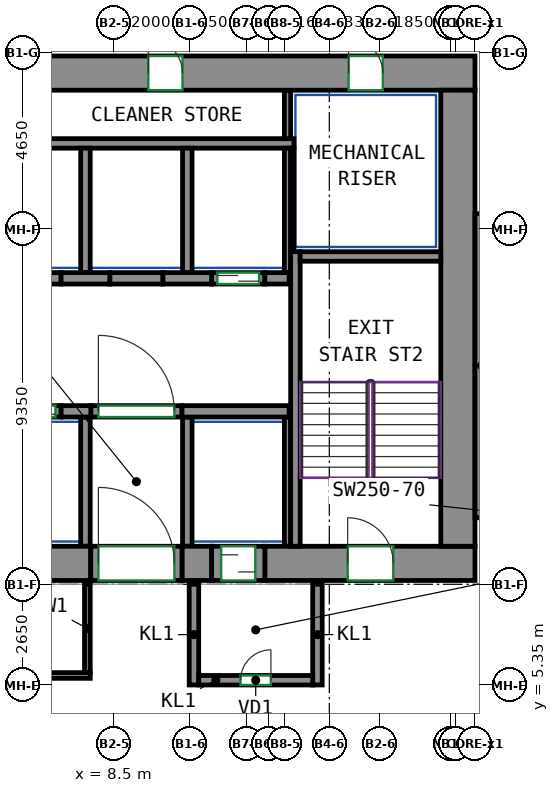
"""IFC4 building model, lengths in metres.
Left out: names, types, materials, properties, quantities, classifications, styles, units other than length and angle.
Written with IfcOpenShell. Run it as: python <this file> out.ifc"""

import sys

from ifc_helpers import new_model, si_unit, direction, frame, frame_2d, origin, place, context, subcontext, project, spatial, rectangle, extrude, source, transform, mapped, element, fill, save


model = new_model("IFC4")
c1 = context("Model", 3, precision=1e-05, world=origin(), true_north=direction((0.0, 1.0)))
c2 = subcontext(c1, "Body", "Model", "MODEL_VIEW")
j1 = project(units=[si_unit("LENGTHUNIT", "METRE"), si_unit("PLANEANGLEUNIT", "RADIAN")], contexts=[c1])
p1 = place(None, origin())
s1 = spatial("IfcSite", under=j1, at=p1, CompositionType="ELEMENT")
p2 = place(p1, origin())
s2 = spatial("IfcBuilding", under=s1, at=p2, CompositionType="ELEMENT")
p3 = place(p2, frame((0.0, 0.0, 178.7)))
s3 = spatial("IfcBuildingStorey", under=s2, at=p3, CompositionType="ELEMENT", Elevation=178.7)
m1 = source(origin(), c2, "Body", "SweptSolid", [
    extrude(rectangle(XDim=14.18, YDim=0.9, at=frame_2d((7.09, 0.0))), origin(), (0.0, 0.0, 1.0), 3.12),
])
p4 = place(p3, frame((-6.29, 8.55, 0.0), z_axis=(0.0, 0.0, 1.0), x_axis=(1.0, 0.0, 0.0)))
e1 = element("IfcWall", 1, at=p4, inside=s3, PredefinedType="SHEAR", context=c2, shape_type="MappedRepresentation", body=[
    mapped(m1, transform((0.0, 0.0, 0.0))),
])
m2 = source(origin(), c2, "Body", "SweptSolid", [
    extrude(rectangle(XDim=0.78, YDim=0.9, at=frame_2d((0.39, 0.0))), origin(), (0.0, 0.0, 1.0), 3.12),
])
p5 = place(p3, frame((10.29, 8.55, 0.0), z_axis=(0.0, 0.0, 1.0), x_axis=(1.0, 0.0, 0.0)))
e2 = element("IfcWall", 2, at=p5, inside=s3, PredefinedType="SHEAR", context=c2, shape_type="MappedRepresentation", body=[
    mapped(m2, transform((0.0, 0.0, 0.0))),
])
m3 = source(origin(), c2, "Body", "SweptSolid", [
    extrude(rectangle(XDim=5.53, YDim=0.9, at=frame_2d((2.765, 0.0))), origin(), (0.0, 0.0, 1.0), 3.12),
])
p6 = place(p3, frame((12.47, 8.55, 0.0), z_axis=(0.0, 0.0, 1.0), x_axis=(1.0, 0.0, 0.0)))
e3 = element("IfcWall", 3, at=p6, inside=s3, PredefinedType="SHEAR", context=c2, shape_type="MappedRepresentation", body=[
    mapped(m3, transform((0.0, 0.0, 0.0))),
])
p7 = place(p6, frame((2.18, 0.0, 0.0)))
e4 = element("IfcOpeningElement", 4, at=p7, cuts=e3, PredefinedType="OPENING", context=c2, shape_type="SweptSolid", body=[
    extrude(rectangle(XDim=1.2, YDim=2.1, at=frame_2d((0.6, 1.05))), frame((0.0, 0.46, 0.0), z_axis=(0.0, -1.0, 0.0), x_axis=(1.0, 0.0, 0.0)), (0.0, 0.0, 1.0), 0.92),
])
m4 = source(origin(), c2, "Body", "SweptSolid", [
    extrude(rectangle(XDim=33.9, YDim=0.9, at=frame_2d((16.95, 0.0))), origin(), (0.0, 0.0, 1.0), 3.12),
])
p8 = place(p3, frame((-15.9, 21.45, 0.0), z_axis=(0.0, 0.0, 1.0), x_axis=(1.0, 0.0, 0.0)))
e5 = element("IfcWall", 5, at=p8, inside=s3, PredefinedType="SHEAR", context=c2, shape_type="MappedRepresentation", body=[
    mapped(m4, transform((0.0, 0.0, 0.0))),
])
p9 = place(p8, frame((8.42, 0.0, 0.0)))
e6 = element("IfcOpeningElement", 6, at=p9, cuts=e5, PredefinedType="OPENING", context=c2, shape_type="SweptSolid", body=[
    extrude(rectangle(XDim=0.9, YDim=2.1, at=frame_2d((0.45, 1.05))), frame((0.0, 0.46, 0.0), z_axis=(0.0, -1.0, 0.0), x_axis=(1.0, 0.0, 0.0)), (0.0, 0.0, 1.0), 0.92),
])
p10 = place(p8, frame((15.12, 0.0, 0.0)))
e7 = element("IfcOpeningElement", 7, at=p10, cuts=e5, PredefinedType="OPENING", context=c2, shape_type="SweptSolid", body=[
    extrude(rectangle(XDim=0.9, YDim=2.1, at=frame_2d((0.45, 1.05))), frame((0.0, 0.46, 0.0), z_axis=(0.0, -1.0, 0.0), x_axis=(1.0, 0.0, 0.0)), (0.0, 0.0, 1.0), 0.92),
])
p11 = place(p8, frame((19.944, 0.0, 0.0)))
e8 = element("IfcOpeningElement", 8, at=p11, cuts=e5, PredefinedType="OPENING", context=c2, shape_type="SweptSolid", body=[
    extrude(rectangle(XDim=0.9, YDim=2.1, at=frame_2d((0.45, 1.05))), frame((0.0, 0.46, 0.0), z_axis=(0.0, -1.0, 0.0), x_axis=(1.0, 0.0, 0.0)), (0.0, 0.0, 1.0), 0.92),
])
p12 = place(p8, frame((25.304, 0.0, 0.0)))
e9 = element("IfcOpeningElement", 9, at=p12, cuts=e5, PredefinedType="OPENING", context=c2, shape_type="SweptSolid", body=[
    extrude(rectangle(XDim=0.9, YDim=2.1, at=frame_2d((0.45, 1.05))), frame((0.0, 0.46, 0.0), z_axis=(0.0, -1.0, 0.0), x_axis=(1.0, 0.0, 0.0)), (0.0, 0.0, 1.0), 0.92),
])
p13 = place(p8, frame((2.425, 0.0, 0.0)))
e10 = element("IfcOpeningElement", 10, at=p13, cuts=e5, PredefinedType="OPENING", context=c2, shape_type="SweptSolid", body=[
    extrude(rectangle(XDim=0.9, YDim=2.1, at=frame_2d((0.45, 1.05))), frame((0.0, 0.46, 0.0), z_axis=(0.0, -1.0, 0.0), x_axis=(1.0, 0.0, 0.0)), (0.0, 0.0, 1.0), 0.92),
])
p14 = place(p8, frame((30.575, 0.0, 0.0)))
e11 = element("IfcOpeningElement", 11, at=p14, cuts=e5, PredefinedType="OPENING", context=c2, shape_type="SweptSolid", body=[
    extrude(rectangle(XDim=0.9, YDim=2.1, at=frame_2d((0.45, 1.05))), frame((0.0, 0.46, 0.0), z_axis=(0.0, -1.0, 0.0), x_axis=(1.0, 0.0, 0.0)), (0.0, 0.0, 1.0), 0.92),
])
m5 = source(origin(), c2, "Body", "SweptSolid", [
    extrude(rectangle(XDim=12.0, YDim=0.9, at=frame_2d((6.0, 0.0))), origin(), (0.0, 0.0, 1.0), 3.12),
])
p15 = place(p3, frame((17.55, 9.0, 0.0), z_axis=(0.0, 0.0, 1.0), x_axis=(0.0, 1.0, 0.0)))
e12 = element("IfcWall", 12, at=p15, inside=s3, PredefinedType="SHEAR", context=c2, shape_type="MappedRepresentation", body=[
    mapped(m5, transform((0.0, 0.0, 0.0))),
])
m6 = source(origin(), c2, "Body", "SweptSolid", [
    extrude(rectangle(XDim=7.75, YDim=0.25, at=frame_2d((3.875, 0.0))), origin(), (0.0, 0.0, 1.0), 3.12),
])
p16 = place(p3, frame((13.275, 9.0, 0.0), z_axis=(0.0, 0.0, 1.0), x_axis=(0.0, 1.0, 0.0)))
e13 = element("IfcWall", 13, at=p16, inside=s3, PredefinedType="SHEAR", context=c2, shape_type="MappedRepresentation", body=[
    mapped(m6, transform((0.0, 0.0, 0.0))),
])
m7 = source(origin(), c2, "Body", "SweptSolid", [
    extrude(rectangle(XDim=3.7, YDim=0.25, at=frame_2d((1.85, 0.0))), origin(), (0.0, 0.0, 1.0), 3.12),
])
p17 = place(p3, frame((13.4, 16.625, 0.0), z_axis=(0.0, 0.0, 1.0), x_axis=(1.0, 0.0, 0.0)))
e14 = element("IfcWall", 14, at=p17, inside=s3, PredefinedType="SHEAR", context=c2, shape_type="MappedRepresentation", body=[
    mapped(m7, transform((0.0, 0.0, 0.0))),
])
m8 = source(origin(), c2, "Body", "SweptSolid", [
    extrude(rectangle(XDim=8.0, YDim=0.35, at=frame_2d((4.0, 0.0))), origin(), (0.0, 0.0, 1.0), 3.12),
])
p18 = place(p3, frame((18.175, 9.75, 0.0), z_axis=(0.0, 0.0, 1.0), x_axis=(0.0, 1.0, 0.0)))
e15 = element("IfcWall", 15, at=p18, inside=s3, PredefinedType="SHEAR", context=c2, shape_type="MappedRepresentation", body=[
    mapped(m8, transform((0.0, 0.0, 0.0))),
])
m9 = source(origin(), c2, "Body", "SweptSolid", [
    extrude(rectangle(XDim=0.78, YDim=0.3, at=frame_2d((0.39, 0.0))), origin(), (0.0, 0.0, 1.0), 3.12),
])
p19 = place(p3, frame((7.11, 12.55, 0.0), z_axis=(0.0, 0.0, 1.0), x_axis=(1.0, 0.0, 0.0)))
e16 = element("IfcWall", 16, at=p19, inside=s3, PredefinedType="SHEAR", context=c2, shape_type="MappedRepresentation", body=[
    mapped(m9, transform((0.0, 0.0, 0.0))),
])
m10 = source(origin(), c2, "Body", "SweptSolid", [
    extrude(rectangle(XDim=2.82, YDim=0.3, at=frame_2d((1.41, 0.0))), origin(), (0.0, 0.0, 1.0), 3.12),
])
p20 = place(p3, frame((10.29, 12.55, 0.0), z_axis=(0.0, 0.0, 1.0), x_axis=(1.0, 0.0, 0.0)))
e17 = element("IfcWall", 17, at=p20, inside=s3, PredefinedType="SHEAR", context=c2, shape_type="MappedRepresentation", body=[
    mapped(m10, transform((0.0, 0.0, 0.0))),
])
m11 = source(origin(), c2, "Body", "SweptSolid", [
    extrude(rectangle(XDim=1.28, YDim=0.3, at=frame_2d((0.64, 0.0))), origin(), (0.0, 0.0, 1.0), 3.12),
])
p21 = place(p3, frame((7.11, 16.05, 0.0), z_axis=(0.0, 0.0, 1.0), x_axis=(1.0, 0.0, 0.0)))
e18 = element("IfcWall", 18, at=p21, inside=s3, PredefinedType="SHEAR", context=c2, shape_type="MappedRepresentation", body=[
    mapped(m11, transform((0.0, 0.0, 0.0))),
])
m12 = source(origin(), c2, "Body", "SweptSolid", [
    extrude(rectangle(XDim=1.28, YDim=0.3, at=frame_2d((0.64, 0.0))), origin(), (0.0, 0.0, 1.0), 3.12),
])
p22 = place(p3, frame((9.79, 16.05, 0.0), z_axis=(0.0, 0.0, 1.0), x_axis=(1.0, 0.0, 0.0)))
e19 = element("IfcWall", 19, at=p22, inside=s3, PredefinedType="SHEAR", context=c2, shape_type="MappedRepresentation", body=[
    mapped(m12, transform((0.0, 0.0, 0.0))),
])
m13 = source(origin(), c2, "Body", "SweptSolid", [
    extrude(rectangle(XDim=0.64, YDim=0.3, at=frame_2d((0.32, 0.0))), origin(), (0.0, 0.0, 1.0), 3.12),
])
p23 = place(p3, frame((12.47, 16.05, 0.0), z_axis=(0.0, 0.0, 1.0), x_axis=(1.0, 0.0, 0.0)))
e20 = element("IfcWall", 20, at=p23, inside=s3, PredefinedType="SHEAR", context=c2, shape_type="MappedRepresentation", body=[
    mapped(m13, transform((0.0, 0.0, 0.0))),
])
m14 = source(origin(), c2, "Body", "SweptSolid", [
    extrude(rectangle(XDim=1.4, YDim=0.3, at=frame_2d((0.7, 0.0))), origin(), (0.0, 0.0, 1.0), 3.12),
])
p24 = place(p3, frame((5.71, 12.55, 0.0), z_axis=(0.0, 0.0, 1.0), x_axis=(1.0, 0.0, 0.0)))
e21 = element("IfcWall", 21, at=p24, inside=s3, PredefinedType="PARTITIONING", context=c2, shape_type="MappedRepresentation", body=[
    mapped(m14, transform((0.0, 0.0, 0.0))),
])
p25 = place(p24, frame((0.15, 0.0, 0.0)))
e22 = element("IfcOpeningElement", 22, at=p25, cuts=e21, PredefinedType="OPENING", context=c2, shape_type="SweptSolid", body=[
    extrude(rectangle(XDim=1.1, YDim=2.1, at=frame_2d((0.55, 1.05))), frame((0.0, 0.16, 0.0), z_axis=(0.0, -1.0, 0.0), x_axis=(1.0, 0.0, 0.0)), (0.0, 0.0, 1.0), 0.32),
])
m15 = source(origin(), c2, "Body", "SweptSolid", [
    extrude(rectangle(XDim=1.4, YDim=0.3, at=frame_2d((0.7, 0.0))), origin(), (0.0, 0.0, 1.0), 3.12),
])
p26 = place(p3, frame((11.07, 16.05, 0.0), z_axis=(0.0, 0.0, 1.0), x_axis=(1.0, 0.0, 0.0)))
e23 = element("IfcWall", 23, at=p26, inside=s3, PredefinedType="PARTITIONING", context=c2, shape_type="MappedRepresentation", body=[
    mapped(m15, transform((0.0, 0.0, 0.0))),
])
p27 = place(p26, frame((0.15, 0.0, 0.0)))
e24 = element("IfcOpeningElement", 24, at=p27, cuts=e23, PredefinedType="OPENING", context=c2, shape_type="SweptSolid", body=[
    extrude(rectangle(XDim=1.1, YDim=2.1, at=frame_2d((0.55, 1.05))), frame((0.0, 0.16, 0.0), z_axis=(0.0, -1.0, 0.0), x_axis=(1.0, 0.0, 0.0)), (0.0, 0.0, 1.0), 0.32),
])
m16 = source(origin(), c2, "Body", "SweptSolid", [
    extrude(rectangle(XDim=2.4, YDim=0.3, at=frame_2d((1.2, 0.0))), origin(), (0.0, 0.0, 1.0), 3.12),
])
p28 = place(p3, frame((7.89, 12.55, 0.0), z_axis=(0.0, 0.0, 1.0), x_axis=(1.0, 0.0, 0.0)))
e25 = element("IfcWall", 25, at=p28, inside=s3, PredefinedType="PARTITIONING", context=c2, shape_type="MappedRepresentation", body=[
    mapped(m16, transform((0.0, 0.0, 0.0))),
])
p29 = place(p28, frame((0.2, 0.0, 0.0)))
e26 = element("IfcOpeningElement", 26, at=p29, cuts=e25, PredefinedType="OPENING", context=c2, shape_type="SweptSolid", body=[
    extrude(rectangle(XDim=2.0, YDim=2.1, at=frame_2d((1.0, 1.05))), frame((0.0, 0.16, 0.0), z_axis=(0.0, -1.0, 0.0), x_axis=(1.0, 0.0, 0.0)), (0.0, 0.0, 1.0), 0.32),
])
for number, where, z_axis, x_axis in (
    (27, (5.71, 16.05, 0.0), (0.0, 0.0, 1.0), (1.0, 0.0, 0.0)),
    (28, (8.39, 16.05, 0.0), (0.0, 0.0, 1.0), (1.0, 0.0, 0.0)),
):
    element("IfcWall", number, at=place(p3, frame(where, z_axis=z_axis, x_axis=x_axis)), inside=s3, PredefinedType="PARTITIONING", context=c2, shape_type="MappedRepresentation", body=[
        mapped(m14, transform((0.0, 0.0, 0.0))),
    ])
m17 = source(origin(), c2, "Body", "SweptSolid", [
    extrude(rectangle(XDim=2.65, YDim=0.25, at=frame_2d((1.325, 0.0))), origin(), (0.0, 0.0, 1.0), 3.12),
])
for number, where, z_axis, x_axis in (
    (29, (10.605, 5.35, 0.0), (0.0, 0.0, 1.0), (0.0, 1.0, 0.0)),
    (30, (13.855, 5.35, 0.0), (0.0, 0.0, 1.0), (0.0, 1.0, 0.0)),
):
    element("IfcWall", number, at=place(p3, frame(where, z_axis=z_axis, x_axis=x_axis)), inside=s3, PredefinedType="PARTITIONING", context=c2, shape_type="MappedRepresentation", body=[
        mapped(m17, transform((0.0, 0.0, 0.0))),
    ])
m18 = source(origin(), c2, "Body", "SweptSolid", [
    extrude(rectangle(XDim=3.0, YDim=0.25, at=frame_2d((1.5, 0.0))), origin(), (0.0, 0.0, 1.0), 3.12),
])
p30 = place(p3, frame((10.73, 5.475, 0.0), z_axis=(0.0, 0.0, 1.0), x_axis=(1.0, 0.0, 0.0)))
e31 = element("IfcWall", 31, at=p30, inside=s3, PredefinedType="PARTITIONING", context=c2, shape_type="MappedRepresentation", body=[
    mapped(m18, transform((0.0, 0.0, 0.0))),
])
p31 = place(p30, frame((1.1, 0.0, 0.0)))
e32 = element("IfcOpeningElement", 32, at=p31, cuts=e31, PredefinedType="OPENING", context=c2, shape_type="SweptSolid", body=[
    extrude(rectangle(XDim=0.8, YDim=2.0, at=frame_2d((0.4, 1.0))), frame((0.0, 0.135, 0.0), z_axis=(0.0, -1.0, 0.0), x_axis=(1.0, 0.0, 0.0)), (0.0, 0.0, 1.0), 0.27),
])
m19 = source(origin(), c2, "Body", "SweptSolid", [
    extrude(rectangle(XDim=10.97, YDim=0.25, at=frame_2d((5.485, 0.0))), origin(), (0.0, 0.0, 1.0), 3.12),
])
p32 = place(p3, frame((2.265, 19.6, 0.0), z_axis=(0.0, 0.0, 1.0), x_axis=(1.0, 0.0, 0.0)))
e33 = element("IfcWall", 33, at=p32, inside=s3, PredefinedType="PARTITIONING", context=c2, shape_type="MappedRepresentation", body=[
    mapped(m19, transform((0.0, 0.0, 0.0))),
])
m20 = source(origin(), c2, "Body", "SweptSolid", [
    extrude(rectangle(XDim=3.275, YDim=0.165, at=frame_2d((1.638, 0.0))), origin(), (0.0, 0.0, 1.0), 3.12),
])
p33 = place(p3, frame((13.067, 16.2, 0.0), z_axis=(0.0, 0.0, 1.0), x_axis=(0.0, 1.0, 0.0)))
e34 = element("IfcWall", 34, at=p33, inside=s3, PredefinedType="PARTITIONING", context=c2, shape_type="MappedRepresentation", body=[
    mapped(m20, transform((0.0, 0.0, 0.0))),
])
m21 = source(origin(), c2, "Body", "SweptSolid", [
    extrude(rectangle(XDim=1.275, YDim=0.165, at=frame_2d((0.637, 0.0))), origin(), (0.0, 0.0, 1.0), 3.12),
])
p34 = place(p3, frame((13.067, 19.725, 0.0), z_axis=(0.0, 0.0, 1.0), x_axis=(0.0, 1.0, 0.0)))
e35 = element("IfcWall", 35, at=p34, inside=s3, PredefinedType="PARTITIONING", context=c2, shape_type="MappedRepresentation", body=[
    mapped(m21, transform((0.0, 0.0, 0.0))),
])
m22 = source(origin(), c2, "Body", "SweptSolid", [
    extrude(rectangle(XDim=3.275, YDim=0.25, at=frame_2d((1.638, 0.0))), origin(), (0.0, 0.0, 1.0), 3.12),
])
p35 = place(p3, frame((10.43, 16.2, 0.0), z_axis=(0.0, 0.0, 1.0), x_axis=(0.0, 1.0, 0.0)))
e36 = element("IfcWall", 36, at=p35, inside=s3, PredefinedType="PARTITIONING", context=c2, shape_type="MappedRepresentation", body=[
    mapped(m22, transform((0.0, 0.0, 0.0))),
])
m23 = source(origin(), c2, "Body", "SweptSolid", [
    extrude(rectangle(XDim=2.725, YDim=0.085, at=frame_2d((1.363, 0.0))), origin(), (0.0, 0.0, 1.0), 3.12),
])
p36 = place(p3, frame((13.192, 16.75, 0.0), z_axis=(0.0, 0.0, 1.0), x_axis=(0.0, 1.0, 0.0)))
e37 = element("IfcWall", 37, at=p36, inside=s3, PredefinedType="PARTITIONING", context=c2, shape_type="MappedRepresentation", body=[
    mapped(m23, transform((0.0, 0.0, 0.0))),
])
p37 = place(p3, frame((7.75, 16.2, 0.0), z_axis=(0.0, 0.0, 1.0), x_axis=(0.0, 1.0, 0.0)))
e38 = element("IfcWall", 38, at=p37, inside=s3, PredefinedType="PARTITIONING", context=c2, shape_type="MappedRepresentation", body=[
    mapped(m22, transform((0.0, 0.0, 0.0))),
])
m24 = source(origin(), c2, "Body", "SweptSolid", [
    extrude(rectangle(XDim=3.4, YDim=0.25, at=frame_2d((1.7, 0.0))), origin(), (0.0, 0.0, 1.0), 3.12),
])
p38 = place(p3, frame((10.43, 9.0, 0.0), z_axis=(0.0, 0.0, 1.0), x_axis=(0.0, 1.0, 0.0)))
e39 = element("IfcWall", 39, at=p38, inside=s3, PredefinedType="PARTITIONING", context=c2, shape_type="MappedRepresentation", body=[
    mapped(m24, transform((0.0, 0.0, 0.0))),
])
m25 = source(origin(), c2, "Body", "SweptSolid", [
    extrude(rectangle(XDim=3.4, YDim=0.165, at=frame_2d((1.7, 0.0))), origin(), (0.0, 0.0, 1.0), 3.12),
])
p39 = place(p3, frame((13.067, 9.0, 0.0), z_axis=(0.0, 0.0, 1.0), x_axis=(0.0, 1.0, 0.0)))
e40 = element("IfcWall", 40, at=p39, inside=s3, PredefinedType="PARTITIONING", context=c2, shape_type="MappedRepresentation", body=[
    mapped(m25, transform((0.0, 0.0, 0.0))),
])
p40 = place(p3, frame((7.75, 9.0, 0.0), z_axis=(0.0, 0.0, 1.0), x_axis=(0.0, 1.0, 0.0)))
e41 = element("IfcWall", 41, at=p40, inside=s3, PredefinedType="PARTITIONING", context=c2, shape_type="MappedRepresentation", body=[
    mapped(m24, transform((0.0, 0.0, 0.0))),
])
m26 = source(origin(), c2, "Body", "SweptSolid", [
    extrude(rectangle(XDim=2.4, YDim=0.9, at=frame_2d((1.2, 0.0))), origin(), (0.0, 0.0, 1.0), 2.7),
])
p41 = place(p3, frame((7.89, 8.55, 0.0), z_axis=(0.0, 0.0, 1.0), x_axis=(1.0, 0.0, 0.0)))
e42 = element("IfcWall", 42, at=p41, inside=s3, PredefinedType="PARTITIONING", context=c2, shape_type="MappedRepresentation", body=[
    mapped(m26, transform((0.0, 0.0, 0.0))),
])
p42 = place(p41, frame((0.2, 0.0, 0.0)))
e43 = element("IfcOpeningElement", 43, at=p42, cuts=e42, PredefinedType="OPENING", context=c2, shape_type="SweptSolid", body=[
    extrude(rectangle(XDim=2.0, YDim=2.1, at=frame_2d((1.0, 1.05))), frame((0.0, 0.46, 0.0), z_axis=(0.0, -1.0, 0.0), x_axis=(1.0, 0.0, 0.0)), (0.0, 0.0, 1.0), 0.92),
])
m27 = source(origin(), c2, "Body", "SweptSolid", [
    extrude(rectangle(XDim=1.4, YDim=0.9, at=frame_2d((0.7, 0.0))), origin(), (0.0, 0.0, 1.0), 2.7),
])
p43 = place(p3, frame((11.07, 8.55, 0.0), z_axis=(0.0, 0.0, 1.0), x_axis=(1.0, 0.0, 0.0)))
e44 = element("IfcWall", 44, at=p43, inside=s3, PredefinedType="PARTITIONING", context=c2, shape_type="MappedRepresentation", body=[
    mapped(m27, transform((0.0, 0.0, 0.0))),
])
p44 = place(p43, frame((0.25, 0.0, 0.0)))
e45 = element("IfcOpeningElement", 45, at=p44, cuts=e44, PredefinedType="OPENING", context=c2, shape_type="SweptSolid", body=[
    extrude(rectangle(XDim=0.9, YDim=2.1, at=frame_2d((0.45, 1.05))), frame((0.0, 0.46, 0.0), z_axis=(0.0, -1.0, 0.0), x_axis=(1.0, 0.0, 0.0)), (0.0, 0.0, 1.0), 0.92),
])
p45 = place(p3, frame((7.875, 5.6, 0.0), z_axis=(0.0, 0.0, 1.0), x_axis=(-1.0, 0.0, 0.0)))
e46 = element("IfcWall", 46, at=p45, inside=s3, PredefinedType="PARTITIONING", context=c2, shape_type="SweptSolid", body=[
    extrude(rectangle(XDim=13.275, YDim=0.15, at=frame_2d((6.637, 0.0))), origin(), (0.0, 0.0, 1.0), 3.12),
])
p46 = place(p45, frame((1.609, 0.0, 0.0)))
e47 = element("IfcOpeningElement", 47, at=p46, cuts=e46, PredefinedType="OPENING", context=c2, shape_type="SweptSolid", body=[
    extrude(rectangle(XDim=1.0, YDim=2.1, at=frame_2d((0.5, 1.05))), frame((0.0, 0.085, 0.0), z_axis=(0.0, -1.0, 0.0), x_axis=(1.0, 0.0, 0.0)), (0.0, 0.0, 1.0), 0.17),
])
p47 = place(p3, frame((7.8, 8.0, 0.0), z_axis=(0.0, 0.0, 1.0), x_axis=(0.0, -1.0, 0.0)))
e48 = element("IfcWall", 48, at=p47, inside=s3, PredefinedType="PARTITIONING", context=c2, shape_type="SweptSolid", body=[
    extrude(rectangle(XDim=2.325, YDim=0.15, at=frame_2d((1.163, 0.0))), origin(), (0.0, 0.0, 1.0), 3.12),
])
p48 = place(p29, origin())
e49 = element("IfcDoor", 49, at=p48, inside=s3, OperationType="DOUBLE_DOOR_SINGLE_SWING", PredefinedType="DOOR", context=c2, shape_type="SweptSolid", body=[
    extrude(rectangle(XDim=2.0, YDim=2.1, at=frame_2d((1.0, 1.05))), frame((0.0, 0.025, 0.0), z_axis=(0.0, -1.0, 0.0), x_axis=(1.0, 0.0, 0.0)), (0.0, 0.0, 1.0), 0.05),
])
fill(e26, e49)
p49 = place(p42, origin())
e50 = element("IfcDoor", 50, at=p49, inside=s3, OperationType="DOUBLE_DOOR_SINGLE_SWING", PredefinedType="DOOR", context=c2, shape_type="SweptSolid", body=[
    extrude(rectangle(XDim=2.0, YDim=2.1, at=frame_2d((1.0, 1.05))), frame((0.0, 0.355, 0.0), z_axis=(0.0, -1.0, 0.0), x_axis=(1.0, 0.0, 0.0)), (0.0, 0.0, 1.0), 0.05),
])
fill(e43, e50)
p50 = place(p31, origin())
e51 = element("IfcDoor", 51, at=p50, inside=s3, OperationType="SINGLE_SWING_RIGHT", PredefinedType="DOOR", context=c2, shape_type="SweptSolid", body=[
    extrude(rectangle(XDim=0.8, YDim=2.0, at=frame_2d((0.4, 1.0))), frame((0.0, 0.025, 0.0), z_axis=(0.0, -1.0, 0.0), x_axis=(1.0, 0.0, 0.0)), (0.0, 0.0, 1.0), 0.05),
])
fill(e32, e51)
p51 = place(p44, origin())
e52 = element("IfcDoor", 52, at=p51, inside=s3, OperationType="SLIDING_TO_LEFT", PredefinedType="DOOR", context=c2, shape_type="SweptSolid", body=[
    extrude(rectangle(XDim=0.9, YDim=2.1, at=frame_2d((0.45, 1.05))), frame((0.0, 0.355, 0.0), z_axis=(0.0, -1.0, 0.0), x_axis=(1.0, 0.0, 0.0)), (0.0, 0.0, 1.0), 0.05),
])
fill(e45, e52)
p52 = place(p25, origin())
e53 = element("IfcDoor", 53, at=p52, inside=s3, OperationType="DOUBLE_DOOR_SLIDING", PredefinedType="DOOR", context=c2, shape_type="SweptSolid", body=[
    extrude(rectangle(XDim=1.1, YDim=2.1, at=frame_2d((0.55, 1.05))), frame((0.0, 0.025, 0.0), z_axis=(0.0, -1.0, 0.0), x_axis=(1.0, 0.0, 0.0)), (0.0, 0.0, 1.0), 0.05),
])
fill(e22, e53)
p53 = place(p27, origin())
e54 = element("IfcDoor", 54, at=p53, inside=s3, OperationType="DOUBLE_DOOR_SLIDING", PredefinedType="DOOR", context=c2, shape_type="SweptSolid", body=[
    extrude(rectangle(XDim=1.1, YDim=2.1, at=frame_2d((0.55, 1.05))), frame((0.0, 0.025, 0.0), z_axis=(0.0, -1.0, 0.0), x_axis=(1.0, 0.0, 0.0)), (0.0, 0.0, 1.0), 0.05),
])
fill(e24, e54)
p54 = place(p12, origin())
e55 = element("IfcDoor", 55, at=p54, inside=s3, OperationType="SINGLE_SWING_LEFT", PredefinedType="DOOR", context=c2, shape_type="SweptSolid", body=[
    extrude(rectangle(XDim=0.9, YDim=2.1, at=frame_2d((0.45, 1.05))), frame((0.0, -0.305, 0.0), z_axis=(0.0, -1.0, 0.0), x_axis=(1.0, 0.0, 0.0)), (0.0, 0.0, 1.0), 0.05),
])
fill(e9, e55)
p55 = place(p14, origin())
e56 = element("IfcDoor", 56, at=p55, inside=s3, OperationType="SINGLE_SWING_LEFT", PredefinedType="DOOR", context=c2, shape_type="SweptSolid", body=[
    extrude(rectangle(XDim=0.9, YDim=2.1, at=frame_2d((0.45, 1.05))), frame((0.0, -0.305, 0.0), z_axis=(0.0, -1.0, 0.0), x_axis=(1.0, 0.0, 0.0)), (0.0, 0.0, 1.0), 0.05),
])
fill(e11, e56)
p56 = place(p7, origin())
e57 = element("IfcDoor", 57, at=p56, inside=s3, OperationType="DOUBLE_DOOR_SINGLE_SWING", PredefinedType="DOOR", context=c2, shape_type="SweptSolid", body=[
    extrude(rectangle(XDim=1.2, YDim=2.1, at=frame_2d((0.6, 1.05))), frame((0.0, 0.355, 0.0), z_axis=(0.0, -1.0, 0.0), x_axis=(1.0, 0.0, 0.0)), (0.0, 0.0, 1.0), 0.05),
])
fill(e4, e57)
save(model, sys.argv[1])
